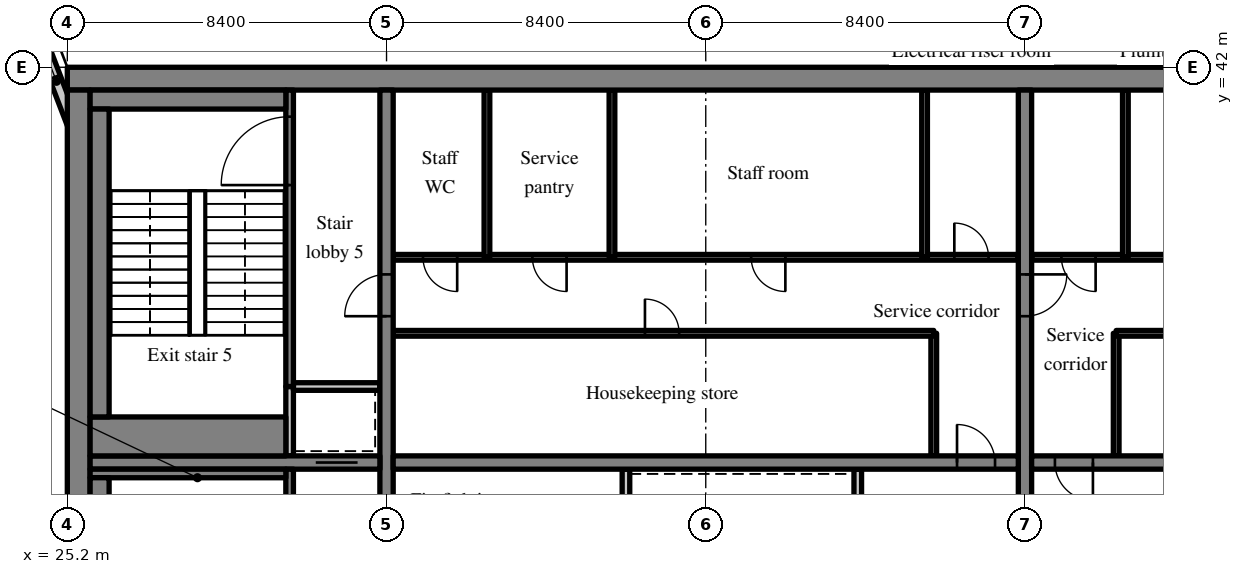
"""IFC4 building model, lengths in metres.
Left out: names, types, materials, properties, quantities, classifications, styles, units other than length and angle.
Written with IfcOpenShell. Run it as: python <this file> out.ifc"""

import sys

from ifc_helpers import new_model, si_unit, direction, frame, frame_2d, origin, place, context, subcontext, project, spatial, rectangle, extrude, source, transform, mapped, element, fill, save


model = new_model("IFC4")
c1 = context("Model", 3, precision=1e-05, world=origin(), true_north=direction((0.0, 1.0)))
c2 = subcontext(c1, "Body", "Model", "MODEL_VIEW")
j1 = project(units=[si_unit("LENGTHUNIT", "METRE"), si_unit("PLANEANGLEUNIT", "RADIAN")], contexts=[c1])
p1 = place(None, origin())
s1 = spatial("IfcSite", under=j1, at=p1, CompositionType="ELEMENT")
p2 = place(p1, origin())
s2 = spatial("IfcBuilding", under=s1, at=p2, CompositionType="ELEMENT")
p3 = place(p2, frame((0.0, 0.0, 249.1)))
s3 = spatial("IfcBuildingStorey", under=s2, at=p3, CompositionType="ELEMENT", Elevation=249.1)
m1 = source(origin(), c2, "Body", "SweptSolid", [
    extrude(rectangle(XDim=50.4, YDim=0.6, at=frame_2d((25.2, 0.0))), origin(), (0.0, 0.0, 1.0), 3.62),
])
p4 = place(p3, frame((25.2, 41.7, 0.0), z_axis=(0.0, 0.0, 1.0), x_axis=(1.0, 0.0, 0.0)))
e1 = element("IfcWall", 1, at=p4, inside=s3, PredefinedType="SHEAR", context=c2, shape_type="MappedRepresentation", body=[
    mapped(m1, transform((0.0, 0.0, 0.0), scale=1.0)),
])
m2 = source(origin(), c2, "Body", "SweptSolid", [
    extrude(rectangle(XDim=18.8, YDim=0.6, at=frame_2d((9.4, 0.0))), origin(), (0.0, 0.0, 1.0), 3.62),
])
p5 = place(p3, frame((25.5, 22.6, 0.0), z_axis=(0.0, 0.0, 1.0), x_axis=(0.0, 1.0, 0.0)))
e2 = element("IfcWall", 2, at=p5, inside=s3, PredefinedType="SHEAR", context=c2, shape_type="MappedRepresentation", body=[
    mapped(m2, transform((0.0, 0.0, 0.0), scale=1.0)),
])
m3 = source(origin(), c2, "Body", "SweptSolid", [
    extrude(rectangle(XDim=18.8, YDim=0.35, at=frame_2d((9.4, 0.0))), origin(), (0.0, 0.0, 1.0), 3.62),
])
p6 = place(p3, frame((33.6, 22.6, 0.0), z_axis=(0.0, 0.0, 1.0), x_axis=(0.0, 1.0, 0.0)))
e3 = element("IfcWall", 3, at=p6, inside=s3, PredefinedType="SHEAR", context=c2, shape_type="MappedRepresentation", body=[
    mapped(m3, transform((0.0, 0.0, 0.0), scale=1.0)),
])
m4 = source(origin(), c2, "Body", "SweptSolid", [
    extrude(rectangle(XDim=1.1, YDim=2.1, at=frame_2d((0.55, 1.05))), frame((0.0, 0.185, 0.0), z_axis=(0.0, -1.0, 0.0), x_axis=(1.0, 0.0, 0.0)), (0.0, 0.0, 1.0), 0.37),
])
p7 = place(p6, frame((12.85, 0.0, 0.0)))
e4 = element("IfcOpeningElement", 4, at=p7, cuts=e3, PredefinedType="OPENING", context=c2, shape_type="MappedRepresentation", body=[
    mapped(m4, transform((0.0, 0.0, 0.0), scale=1.0)),
])
p8 = place(p3, frame((50.4, 22.6, 0.0), z_axis=(0.0, 0.0, 1.0), x_axis=(0.0, 1.0, 0.0)))
e5 = element("IfcWall", 5, at=p8, inside=s3, PredefinedType="SHEAR", context=c2, shape_type="MappedRepresentation", body=[
    mapped(m3, transform((0.0, 0.0, 0.0), scale=1.0)),
])
p9 = place(p8, frame((12.85, 0.0, 0.0)))
e6 = element("IfcOpeningElement", 6, at=p9, cuts=e5, PredefinedType="OPENING", context=c2, shape_type="MappedRepresentation", body=[
    mapped(m4, transform((0.0, 0.0, 0.0), scale=1.0)),
])
m5 = source(origin(), c2, "Body", "SweptSolid", [
    extrude(rectangle(XDim=7.625, YDim=0.35, at=frame_2d((3.812, 0.0))), origin(), (0.0, 0.0, 1.0), 3.62),
])
p10 = place(p3, frame((25.8, 31.6, 0.0), z_axis=(0.0, 0.0, 1.0), x_axis=(1.0, 0.0, 0.0)))
e7 = element("IfcWall", 7, at=p10, inside=s3, PredefinedType="SHEAR", context=c2, shape_type="MappedRepresentation", body=[
    mapped(m5, transform((0.0, 0.0, 0.0), scale=1.0)),
])
p11 = place(p10, frame((5.938, 0.0, 0.0)))
e8 = element("IfcOpeningElement", 8, at=p11, cuts=e7, PredefinedType="OPENING", context=c2, shape_type="MappedRepresentation", body=[
    mapped(m4, transform((0.0, 0.0, 0.0), scale=1.0)),
])
m6 = source(origin(), c2, "Body", "SweptSolid", [
    extrude(rectangle(XDim=16.45, YDim=0.35, at=frame_2d((8.225, 0.0))), origin(), (0.0, 0.0, 1.0), 3.62),
])
p12 = place(p3, frame((33.775, 31.6, 0.0), z_axis=(0.0, 0.0, 1.0), x_axis=(1.0, 0.0, 0.0)))
e9 = element("IfcWall", 9, at=p12, inside=s3, PredefinedType="SHEAR", context=c2, shape_type="MappedRepresentation", body=[
    mapped(m6, transform((0.0, 0.0, 0.0), scale=1.0)),
])
m7 = source(origin(), c2, "Body", "SweptSolid", [
    extrude(rectangle(XDim=1.0, YDim=2.1, at=frame_2d((0.5, 1.05))), frame((0.0, 0.185, 0.0), z_axis=(0.0, -1.0, 0.0), x_axis=(1.0, 0.0, 0.0)), (0.0, 0.0, 1.0), 0.37),
])
p13 = place(p12, frame((14.837, 0.0, 0.0)))
e10 = element("IfcOpeningElement", 10, at=p13, cuts=e9, PredefinedType="OPENING", context=c2, shape_type="MappedRepresentation", body=[
    mapped(m7, transform((0.0, 0.0, 0.0), scale=1.0)),
])
m8 = source(origin(), c2, "Body", "SweptSolid", [
    extrude(rectangle(XDim=16.45, YDim=0.35, at=frame_2d((8.225, 0.0))), origin(), (0.0, 0.0, 1.0), 3.62),
])
p14 = place(p3, frame((50.575, 31.6, 0.0), z_axis=(0.0, 0.0, 1.0), x_axis=(1.0, 0.0, 0.0)))
e11 = element("IfcWall", 11, at=p14, inside=s3, PredefinedType="SHEAR", context=c2, shape_type="MappedRepresentation", body=[
    mapped(m8, transform((0.0, 0.0, 0.0), scale=1.0)),
])
p15 = place(p14, frame((0.613, 0.0, 0.0)))
e12 = element("IfcOpeningElement", 12, at=p15, cuts=e11, PredefinedType="OPENING", context=c2, shape_type="MappedRepresentation", body=[
    mapped(m7, transform((0.0, 0.0, 0.0), scale=1.0)),
])
m9 = source(origin(), c2, "Body", "SweptSolid", [
    extrude(rectangle(XDim=3.559, YDim=0.3, at=frame_2d((1.78, 0.0))), origin(), (0.0, 0.0, 1.0), 3.62),
])
p16 = place(p3, frame((25.55, 39.969, 0.0), z_axis=(0.0, 0.0, 1.0), x_axis=(-0.35779745313, 0.933799219604, 0.0)))
e13 = element("IfcWall", 13, at=p16, inside=s3, PredefinedType="SOLIDWALL", context=c2, shape_type="MappedRepresentation", body=[
    mapped(m9, transform((0.0, 0.0, 0.0), scale=1.0)),
])
m10 = source(origin(), c2, "Body", "SweptSolid", [
    extrude(rectangle(XDim=1.5, YDim=2.0, at=frame_2d((0.75, 1.0))), frame((0.0, 0.16, 0.0), z_axis=(0.0, -1.0, 0.0), x_axis=(1.0, 0.0, 0.0)), (0.0, 0.0, 1.0), 0.32),
])
p17 = place(p16, frame((1.903, 0.0, 0.9)))
e14 = element("IfcOpeningElement", 14, at=p17, cuts=e13, PredefinedType="OPENING", context=c2, shape_type="MappedRepresentation", body=[
    mapped(m10, transform((0.0, 0.0, 0.0), scale=1.0)),
])
m11 = source(origin(), c2, "Body", "SweptSolid", [
    extrude(rectangle(XDim=8.825, YDim=0.2, at=frame_2d((4.413, 0.0))), origin(), (0.0, 0.0, 1.0), 3.62),
])
p18 = place(p3, frame((39.9, 22.6, 0.0), z_axis=(0.0, 0.0, 1.0), x_axis=(0.0, 1.0, 0.0)))
e15 = element("IfcWall", 15, at=p18, inside=s3, PredefinedType="PARTITIONING", context=c2, shape_type="MappedRepresentation", body=[
    mapped(m11, transform((0.0, 0.0, 0.0), scale=1.0)),
])
m12 = source(origin(), c2, "Body", "SweptSolid", [
    extrude(rectangle(XDim=0.9, YDim=2.1, at=frame_2d((0.45, 1.05))), frame((0.0, 0.11, 0.0), z_axis=(0.0, -1.0, 0.0), x_axis=(1.0, 0.0, 0.0)), (0.0, 0.0, 1.0), 0.22),
])
p19 = place(p18, frame((3.95, 0.0, 0.0)))
e16 = element("IfcOpeningElement", 16, at=p19, cuts=e15, PredefinedType="OPENING", context=c2, shape_type="MappedRepresentation", body=[
    mapped(m12, transform((0.0, 0.0, 0.0), scale=1.0)),
])
m13 = source(origin(), c2, "Body", "SweptSolid", [
    extrude(rectangle(XDim=2.625, YDim=0.2, at=frame_2d((1.312, 0.0))), origin(), (0.0, 0.0, 1.0), 3.62),
])
p20 = place(p3, frame((46.0, 28.8, 0.0), z_axis=(0.0, 0.0, 1.0), x_axis=(0.0, 1.0, 0.0)))
e17 = element("IfcWall", 17, at=p20, inside=s3, PredefinedType="SOLIDWALL", context=c2, shape_type="MappedRepresentation", body=[
    mapped(m13, transform((0.0, 0.0, 0.0), scale=1.0)),
])
m14 = source(origin(), c2, "Body", "SweptSolid", [
    extrude(rectangle(XDim=3.225, YDim=0.15, at=frame_2d((1.613, 0.0))), origin(), (0.0, 0.0, 1.0), 3.62),
])
p21 = place(p3, frame((48.0, 31.775, 0.0), z_axis=(0.0, 0.0, 1.0), x_axis=(0.0, 1.0, 0.0)))
e18 = element("IfcWall", 18, at=p21, inside=s3, PredefinedType="PARTITIONING", context=c2, shape_type="MappedRepresentation", body=[
    mapped(m14, transform((0.0, 0.0, 0.0), scale=1.0)),
])
m15 = source(origin(), c2, "Body", "SweptSolid", [
    extrude(rectangle(XDim=14.225, YDim=0.15, at=frame_2d((7.113, 0.0))), origin(), (0.0, 0.0, 1.0), 3.62),
])
p22 = place(p3, frame((33.775, 35.0, 0.0), z_axis=(0.0, 0.0, 1.0), x_axis=(1.0, 0.0, 0.0)))
e19 = element("IfcWall", 19, at=p22, inside=s3, PredefinedType="PARTITIONING", context=c2, shape_type="MappedRepresentation", body=[
    mapped(m15, transform((0.0, 0.0, 0.0), scale=1.0)),
])
m16 = source(origin(), c2, "Body", "SweptSolid", [
    extrude(rectangle(XDim=0.9, YDim=2.1, at=frame_2d((0.45, 1.05))), frame((0.0, 0.085, 0.0), z_axis=(0.0, -1.0, 0.0), x_axis=(1.0, 0.0, 0.0)), (0.0, 0.0, 1.0), 0.17),
])
p23 = place(p22, frame((6.625, 0.0, 0.0)))
e20 = element("IfcOpeningElement", 20, at=p23, cuts=e19, PredefinedType="OPENING", context=c2, shape_type="MappedRepresentation", body=[
    mapped(m16, transform((0.0, 0.0, 0.0), scale=1.0)),
])
m17 = source(origin(), c2, "Body", "SweptSolid", [
    extrude(rectangle(XDim=16.45, YDim=0.15, at=frame_2d((8.225, 0.0))), origin(), (0.0, 0.0, 1.0), 3.62),
])
p24 = place(p3, frame((33.775, 37.0, 0.0), z_axis=(0.0, 0.0, 1.0), x_axis=(1.0, 0.0, 0.0)))
e21 = element("IfcWall", 21, at=p24, inside=s3, PredefinedType="PARTITIONING", context=c2, shape_type="MappedRepresentation", body=[
    mapped(m17, transform((0.0, 0.0, 0.0), scale=1.0)),
])
p25 = place(p24, frame((0.784, 0.0, 0.0)))
e22 = element("IfcOpeningElement", 22, at=p25, cuts=e21, PredefinedType="OPENING", context=c2, shape_type="MappedRepresentation", body=[
    mapped(m16, transform((0.0, 0.0, 0.0), scale=1.0)),
])
p26 = place(p24, frame((3.663, 0.0, 0.0)))
e23 = element("IfcOpeningElement", 23, at=p26, cuts=e21, PredefinedType="OPENING", context=c2, shape_type="MappedRepresentation", body=[
    mapped(m16, transform((0.0, 0.0, 0.0), scale=1.0)),
])
p27 = place(p24, frame((9.42, 0.0, 0.0)))
e24 = element("IfcOpeningElement", 24, at=p27, cuts=e21, PredefinedType="OPENING", context=c2, shape_type="MappedRepresentation", body=[
    mapped(m16, transform((0.0, 0.0, 0.0), scale=1.0)),
])
p28 = place(p24, frame((14.766, 0.0, 0.0)))
e25 = element("IfcOpeningElement", 25, at=p28, cuts=e21, PredefinedType="OPENING", context=c2, shape_type="MappedRepresentation", body=[
    mapped(m16, transform((0.0, 0.0, 0.0), scale=1.0)),
])
m18 = source(origin(), c2, "Body", "SweptSolid", [
    extrude(rectangle(XDim=4.4, YDim=0.15, at=frame_2d((2.2, 0.0))), origin(), (0.0, 0.0, 1.0), 3.62),
])
for number, where, z_axis, x_axis in (
    (26, (36.242, 37.0, 0.0), (0.0, 0.0, 1.0), (0.0, 1.0, 0.0)),
    (27, (39.532, 37.0, 0.0), (0.0, 0.0, 1.0), (0.0, 1.0, 0.0)),
    (28, (47.758, 37.0, 0.0), (0.0, 0.0, 1.0), (0.0, 1.0, 0.0)),
):
    element("IfcWall", number, at=place(p3, frame(where, z_axis=z_axis, x_axis=x_axis)), inside=s3, PredefinedType="PARTITIONING", context=c2, shape_type="MappedRepresentation", body=[
        mapped(m18, transform((0.0, 0.0, 0.0), scale=1.0)),
    ])
p29 = place(p3, frame((52.8, 31.775, 0.0), z_axis=(0.0, 0.0, 1.0), x_axis=(0.0, 1.0, 0.0)))
e29 = element("IfcWall", 29, at=p29, inside=s3, PredefinedType="PARTITIONING", context=c2, shape_type="MappedRepresentation", body=[
    mapped(m14, transform((0.0, 0.0, 0.0), scale=1.0)),
])
m19 = source(origin(), c2, "Body", "SweptSolid", [
    extrude(rectangle(XDim=14.225, YDim=0.15, at=frame_2d((7.112, 0.0))), origin(), (0.0, 0.0, 1.0), 3.62),
])
p30 = place(p3, frame((67.025, 35.0, 0.0), z_axis=(0.0, 0.0, 1.0), x_axis=(-1.0, 0.0, 0.0)))
e30 = element("IfcWall", 30, at=p30, inside=s3, PredefinedType="PARTITIONING", context=c2, shape_type="MappedRepresentation", body=[
    mapped(m19, transform((0.0, 0.0, 0.0), scale=1.0)),
])
p31 = place(p30, frame((3.441, 0.0, 0.0)))
e31 = element("IfcOpeningElement", 31, at=p31, cuts=e30, PredefinedType="OPENING", context=c2, shape_type="MappedRepresentation", body=[
    mapped(m16, transform((0.0, 0.0, 0.0), scale=1.0)),
])
p32 = place(p30, frame((10.516, 0.0, 0.0)))
e32 = element("IfcOpeningElement", 32, at=p32, cuts=e30, PredefinedType="OPENING", context=c2, shape_type="MappedRepresentation", body=[
    mapped(m16, transform((0.0, 0.0, 0.0), scale=1.0)),
])
m20 = source(origin(), c2, "Body", "SweptSolid", [
    extrude(rectangle(XDim=16.45, YDim=0.15, at=frame_2d((8.225, 0.0))), origin(), (0.0, 0.0, 1.0), 3.62),
])
p33 = place(p3, frame((67.025, 37.0, 0.0), z_axis=(0.0, 0.0, 1.0), x_axis=(-1.0, 0.0, 0.0)))
e33 = element("IfcWall", 33, at=p33, inside=s3, PredefinedType="PARTITIONING", context=c2, shape_type="MappedRepresentation", body=[
    mapped(m20, transform((0.0, 0.0, 0.0), scale=1.0)),
])
p34 = place(p33, frame((6.541, 0.0, 0.0)))
e34 = element("IfcOpeningElement", 34, at=p34, cuts=e33, PredefinedType="OPENING", context=c2, shape_type="MappedRepresentation", body=[
    mapped(m16, transform((0.0, 0.0, 0.0), scale=1.0)),
])
p35 = place(p33, frame((14.766, 0.0, 0.0)))
e35 = element("IfcOpeningElement", 35, at=p35, cuts=e33, PredefinedType="OPENING", context=c2, shape_type="MappedRepresentation", body=[
    mapped(m16, transform((0.0, 0.0, 0.0), scale=1.0)),
])
p36 = place(p3, frame((53.042, 37.0, 0.0), z_axis=(0.0, 0.0, 1.0), x_axis=(0.0, 1.0, 0.0)))
e36 = element("IfcWall", 36, at=p36, inside=s3, PredefinedType="PARTITIONING", context=c2, shape_type="MappedRepresentation", body=[
    mapped(m18, transform((0.0, 0.0, 0.0), scale=1.0)),
])
m21 = source(origin(), c2, "Body", "SweptSolid", [
    extrude(rectangle(XDim=8.825, YDim=0.2, at=frame_2d((4.413, 0.0))), origin(), (0.0, 0.0, 1.0), 3.62),
])
p37 = place(p3, frame((31.05, 22.6, 0.0), z_axis=(0.0, 0.0, 1.0), x_axis=(0.0, 1.0, 0.0)))
e37 = element("IfcWall", 37, at=p37, inside=s3, PredefinedType="SOLIDWALL", context=c2, shape_type="MappedRepresentation", body=[
    mapped(m21, transform((0.0, 0.0, 0.0), scale=1.0)),
])
m22 = source(origin(), c2, "Body", "SweptSolid", [
    extrude(rectangle(XDim=1.2, YDim=2.1, at=frame_2d((0.6, 1.05))), frame((0.0, 0.11, 0.0), z_axis=(0.0, -1.0, 0.0), x_axis=(1.0, 0.0, 0.0)), (0.0, 0.0, 1.0), 0.22),
])
p38 = place(p37, frame((6.9, 0.0, 0.0)))
e38 = element("IfcOpeningElement", 38, at=p38, cuts=e37, PredefinedType="OPENING", context=c2, shape_type="MappedRepresentation", body=[
    mapped(m22, transform((0.0, 0.0, 0.0), scale=1.0)),
])
m23 = source(origin(), c2, "Body", "SweptSolid", [
    extrude(rectangle(XDim=1.825, YDim=0.2, at=frame_2d((0.913, 0.0))), origin(), (0.0, 0.0, 1.0), 3.62),
])
p39 = place(p3, frame((31.05, 31.775, 0.0), z_axis=(0.0, 0.0, 1.0), x_axis=(0.0, 1.0, 0.0)))
e39 = element("IfcWall", 39, at=p39, inside=s3, PredefinedType="SOLIDWALL", context=c2, shape_type="MappedRepresentation", body=[
    mapped(m23, transform((0.0, 0.0, 0.0), scale=1.0)),
])
m24 = source(origin(), c2, "Body", "SweptSolid", [
    extrude(rectangle(XDim=2.275, YDim=0.2, at=frame_2d((1.138, 0.0))), origin(), (0.0, 0.0, 1.0), 3.62),
])
p40 = place(p3, frame((31.15, 33.6, 0.0), z_axis=(0.0, 0.0, 1.0), x_axis=(1.0, 0.0, 0.0)))
e40 = element("IfcWall", 40, at=p40, inside=s3, PredefinedType="SOLIDWALL", context=c2, shape_type="MappedRepresentation", body=[
    mapped(m24, transform((0.0, 0.0, 0.0), scale=1.0)),
])
m25 = source(origin(), c2, "Body", "SweptSolid", [
    extrude(rectangle(XDim=7.8, YDim=0.2, at=frame_2d((3.9, 0.0))), origin(), (0.0, 0.0, 1.0), 3.62),
])
p41 = place(p3, frame((31.05, 33.6, 0.0), z_axis=(0.0, 0.0, 1.0), x_axis=(0.0, 1.0, 0.0)))
e41 = element("IfcWall", 41, at=p41, inside=s3, PredefinedType="SOLIDWALL", context=c2, shape_type="MappedRepresentation", body=[
    mapped(m25, transform((0.0, 0.0, 0.0), scale=1.0)),
])
m26 = source(origin(), c2, "Body", "SweptSolid", [
    extrude(rectangle(XDim=1.8, YDim=2.1, at=frame_2d((0.9, 1.05))), frame((0.0, 0.11, 0.0), z_axis=(0.0, -1.0, 0.0), x_axis=(1.0, 0.0, 0.0)), (0.0, 0.0, 1.0), 0.22),
])
p42 = place(p41, frame((5.3, 0.0, 0.0)))
e42 = element("IfcOpeningElement", 42, at=p42, cuts=e41, PredefinedType="OPENING", context=c2, shape_type="MappedRepresentation", body=[
    mapped(m26, transform((0.0, 0.0, 0.0), scale=1.0)),
])
m27 = source(origin(), c2, "Body", "SweptSolid", [
    extrude(rectangle(XDim=5.15, YDim=0.225, at=frame_2d((2.575, 0.0))), origin(), (0.0, 0.0, 1.0), 3.62),
])
p43 = place(p3, frame((25.8, 31.312, 0.0), z_axis=(0.0, 0.0, 1.0), x_axis=(1.0, 0.0, 0.0)))
e43 = element("IfcWall", 43, at=p43, inside=s3, PredefinedType="SOLIDWALL", context=c2, shape_type="MappedRepresentation", body=[
    mapped(m27, transform((0.0, 0.0, 0.0), scale=1.0)),
])
m28 = source(origin(), c2, "Body", "SweptSolid", [
    extrude(rectangle(XDim=8.1, YDim=0.5, at=frame_2d((4.05, 0.0))), origin(), (0.0, 0.0, 1.0), 3.62),
])
p44 = place(p3, frame((26.05, 23.1, 0.0), z_axis=(0.0, 0.0, 1.0), x_axis=(0.0, 1.0, 0.0)))
e44 = element("IfcWall", 44, at=p44, inside=s3, PredefinedType="SOLIDWALL", context=c2, shape_type="MappedRepresentation", body=[
    mapped(m28, transform((0.0, 0.0, 0.0), scale=1.0)),
])
m29 = source(origin(), c2, "Body", "SweptSolid", [
    extrude(rectangle(XDim=5.15, YDim=0.5, at=frame_2d((2.575, 0.0))), origin(), (0.0, 0.0, 1.0), 3.62),
])
p45 = place(p3, frame((25.8, 41.15, 0.0), z_axis=(0.0, 0.0, 1.0), x_axis=(1.0, 0.0, 0.0)))
e45 = element("IfcWall", 45, at=p45, inside=s3, PredefinedType="SOLIDWALL", context=c2, shape_type="MappedRepresentation", body=[
    mapped(m29, transform((0.0, 0.0, 0.0), scale=1.0)),
])
m30 = source(origin(), c2, "Body", "SweptSolid", [
    extrude(rectangle(XDim=5.15, YDim=1.025, at=frame_2d((2.575, 0.0))), origin(), (0.0, 0.0, 1.0), 3.62),
])
p46 = place(p3, frame((25.8, 32.287, 0.0), z_axis=(0.0, 0.0, 1.0), x_axis=(1.0, 0.0, 0.0)))
e46 = element("IfcWall", 46, at=p46, inside=s3, PredefinedType="SOLIDWALL", context=c2, shape_type="MappedRepresentation", body=[
    mapped(m30, transform((0.0, 0.0, 0.0), scale=1.0)),
])
p47 = place(p3, frame((26.05, 32.8, 0.0), z_axis=(0.0, 0.0, 1.0), x_axis=(0.0, 1.0, 0.0)))
e47 = element("IfcWall", 47, at=p47, inside=s3, PredefinedType="SOLIDWALL", context=c2, shape_type="MappedRepresentation", body=[
    mapped(m28, transform((0.0, 0.0, 0.0), scale=1.0)),
])
m31 = source(origin(), c2, "Body", "SweptSolid", [
    extrude(rectangle(XDim=1.5, YDim=2.0, at=frame_2d((0.75, 1.0))), frame((0.0, 0.03, 0.0), z_axis=(0.0, -1.0, 0.0), x_axis=(1.0, 0.0, 0.0)), (0.0, 0.0, 1.0), 0.06),
])
p48 = place(p17, origin())
e48 = element("IfcWindow", 48, at=p48, inside=s3, PartitioningType="SINGLE_PANEL", PredefinedType="WINDOW", context=c2, shape_type="MappedRepresentation", body=[
    mapped(m31, transform((0.0, 0.0, 0.0), scale=1.0)),
])
fill(e14, e48)
m32 = source(origin(), c2, "Body", "SweptSolid", [
    extrude(rectangle(XDim=1.0, YDim=2.1, at=frame_2d((0.5, 1.05))), frame((0.0, 0.025, 0.0), z_axis=(0.0, -1.0, 0.0), x_axis=(1.0, 0.0, 0.0)), (0.0, 0.0, 1.0), 0.05),
])
p49 = place(p13, origin())
e49 = element("IfcDoor", 49, at=p49, inside=s3, OperationType="SINGLE_SWING_LEFT", PredefinedType="DOOR", context=c2, shape_type="MappedRepresentation", body=[
    mapped(m32, transform((0.0, 0.0, 0.0), scale=1.0)),
])
fill(e10, e49)
m33 = source(origin(), c2, "Body", "SweptSolid", [
    extrude(rectangle(XDim=0.9, YDim=2.1, at=frame_2d((0.45, 1.05))), frame((0.0, 0.025, 0.0), z_axis=(0.0, -1.0, 0.0), x_axis=(1.0, 0.0, 0.0)), (0.0, 0.0, 1.0), 0.05),
])
p50 = place(p23, origin())
e50 = element("IfcDoor", 50, at=p50, inside=s3, OperationType="SINGLE_SWING_LEFT", PredefinedType="DOOR", context=c2, shape_type="MappedRepresentation", body=[
    mapped(m33, transform((0.0, 0.0, 0.0), scale=1.0)),
])
fill(e20, e50)
p51 = place(p25, origin())
e51 = element("IfcDoor", 51, at=p51, inside=s3, OperationType="SINGLE_SWING_RIGHT", PredefinedType="DOOR", context=c2, shape_type="MappedRepresentation", body=[
    mapped(m33, transform((0.0, 0.0, 0.0), scale=1.0)),
])
fill(e22, e51)
p52 = place(p26, origin())
e52 = element("IfcDoor", 52, at=p52, inside=s3, OperationType="SINGLE_SWING_RIGHT", PredefinedType="DOOR", context=c2, shape_type="MappedRepresentation", body=[
    mapped(m33, transform((0.0, 0.0, 0.0), scale=1.0)),
])
fill(e23, e52)
p53 = place(p27, origin())
e53 = element("IfcDoor", 53, at=p53, inside=s3, OperationType="SINGLE_SWING_RIGHT", PredefinedType="DOOR", context=c2, shape_type="MappedRepresentation", body=[
    mapped(m33, transform((0.0, 0.0, 0.0), scale=1.0)),
])
fill(e24, e53)
p54 = place(p28, origin())
e54 = element("IfcDoor", 54, at=p54, inside=s3, OperationType="SINGLE_SWING_LEFT", PredefinedType="DOOR", context=c2, shape_type="MappedRepresentation", body=[
    mapped(m33, transform((0.0, 0.0, 0.0), scale=1.0)),
])
fill(e25, e54)
p55 = place(p15, origin())
e55 = element("IfcDoor", 55, at=p55, inside=s3, OperationType="SINGLE_SWING_RIGHT", PredefinedType="DOOR", context=c2, shape_type="MappedRepresentation", body=[
    mapped(m32, transform((0.0, 0.0, 0.0), scale=1.0)),
])
fill(e12, e55)
p56 = place(p35, origin())
e56 = element("IfcDoor", 56, at=p56, inside=s3, OperationType="SINGLE_SWING_LEFT", PredefinedType="DOOR", context=c2, shape_type="MappedRepresentation", body=[
    mapped(m33, transform((0.0, 0.0, 0.0), scale=1.0)),
])
fill(e35, e56)
m34 = source(origin(), c2, "Body", "SweptSolid", [
    extrude(rectangle(XDim=1.1, YDim=2.1, at=frame_2d((0.55, 1.05))), frame((0.0, 0.025, 0.0), z_axis=(0.0, -1.0, 0.0), x_axis=(1.0, 0.0, 0.0)), (0.0, 0.0, 1.0), 0.05),
])
p57 = place(p11, origin())
e57 = element("IfcDoor", 57, at=p57, inside=s3, OperationType="SLIDING_TO_RIGHT", PredefinedType="DOOR", context=c2, shape_type="MappedRepresentation", body=[
    mapped(m34, transform((0.0, 0.0, 0.0), scale=1.0)),
])
fill(e8, e57)
m35 = source(origin(), c2, "Body", "SweptSolid", [
    extrude(rectangle(XDim=1.8, YDim=2.1, at=frame_2d((0.9, 1.05))), frame((0.0, 0.025, 0.0), z_axis=(0.0, -1.0, 0.0), x_axis=(1.0, 0.0, 0.0)), (0.0, 0.0, 1.0), 0.05),
])
p58 = place(p42, origin())
e58 = element("IfcDoor", 58, at=p58, inside=s3, OperationType="SINGLE_SWING_LEFT", PredefinedType="DOOR", context=c2, shape_type="MappedRepresentation", body=[
    mapped(m35, transform((0.0, 0.0, 0.0), scale=1.0)),
])
fill(e42, e58)
p59 = place(p7, origin())
e59 = element("IfcDoor", 59, at=p59, inside=s3, OperationType="SINGLE_SWING_LEFT", PredefinedType="DOOR", context=c2, shape_type="MappedRepresentation", body=[
    mapped(m34, transform((0.0, 0.0, 0.0), scale=1.0)),
])
fill(e4, e59)
p60 = place(p9, origin())
e60 = element("IfcDoor", 60, at=p60, inside=s3, OperationType="SINGLE_SWING_RIGHT", PredefinedType="DOOR", context=c2, shape_type="MappedRepresentation", body=[
    mapped(m34, transform((0.0, 0.0, 0.0), scale=1.0)),
])
fill(e6, e60)
save(model, sys.argv[1])
